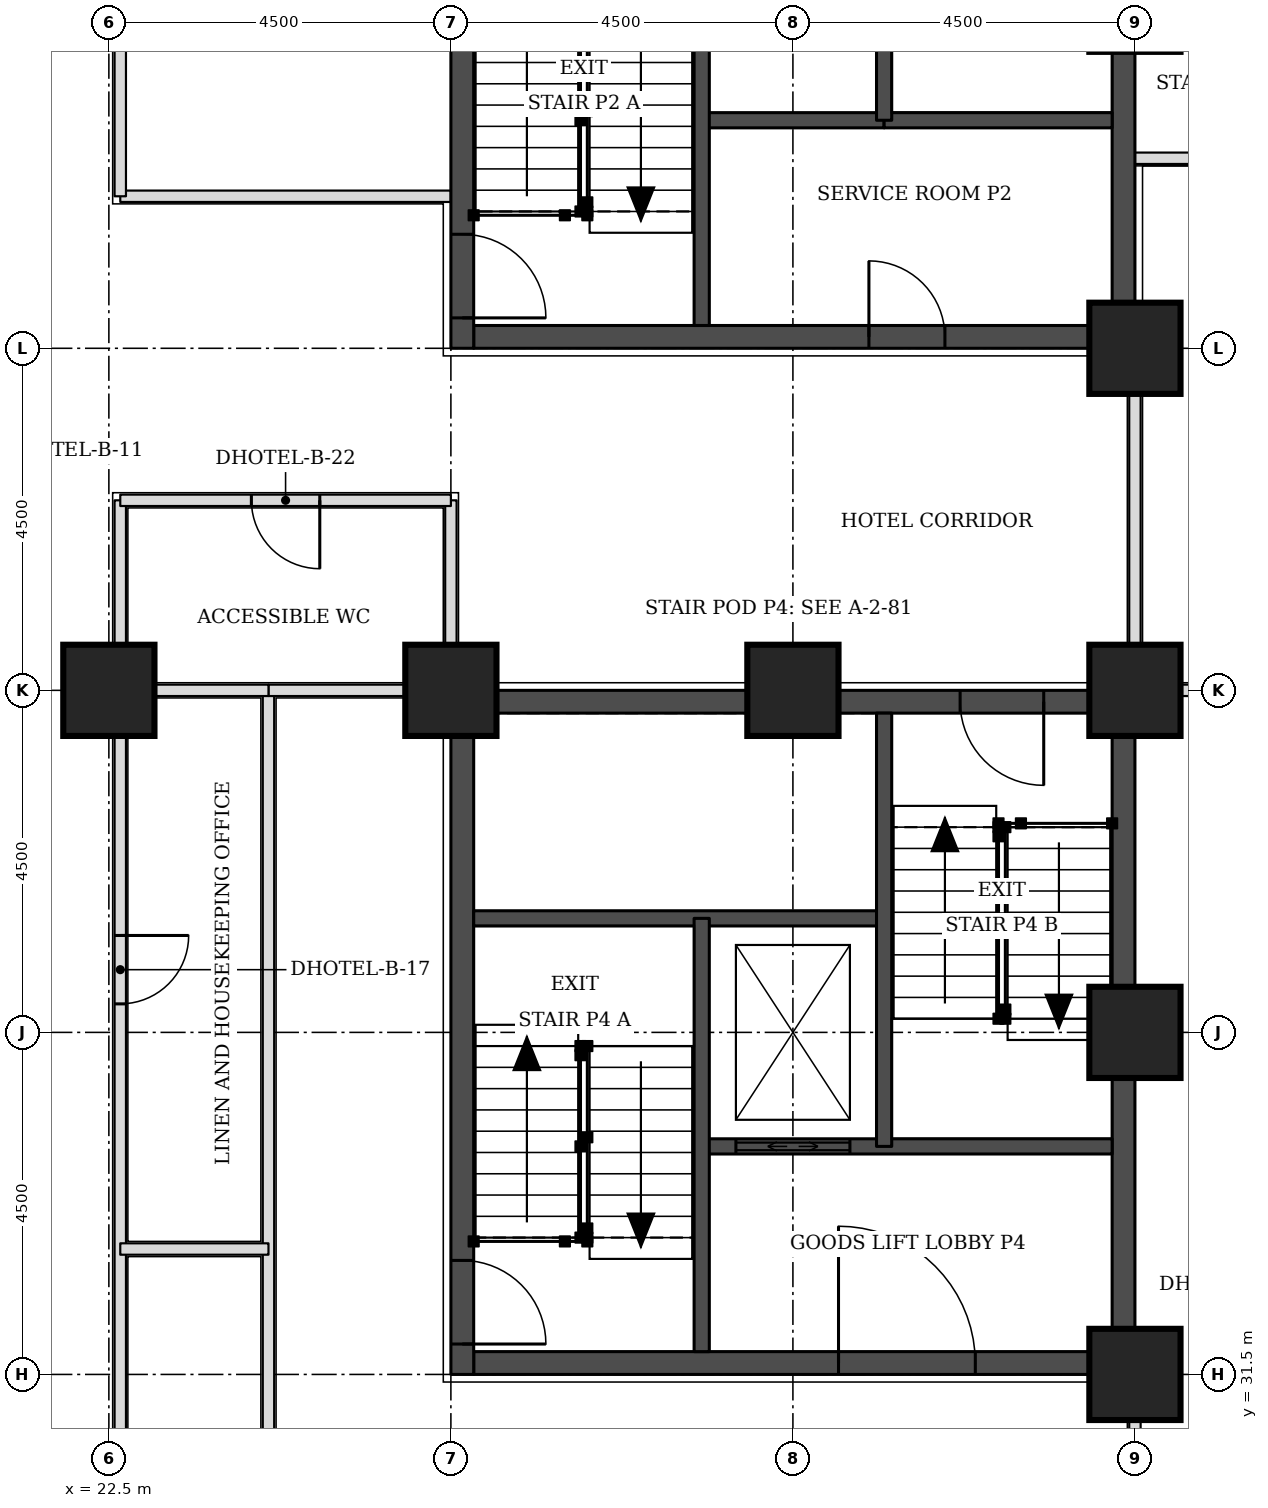
"""IFC4 building model, lengths in metres.
Left out: names, types, materials, properties, quantities, classifications, styles, units other than length and angle.
Written with IfcOpenShell. Run it as: python <this file> out.ifc"""

import sys

from ifc_helpers import new_model, si_unit, direction, frame, frame_2d, origin, origin_2d, place, context, subcontext, project, spatial, rectangle, extrude, element, fill, save


model = new_model("IFC4")
c1 = context("Model", 3, precision=1e-05, world=origin(), true_north=direction((0.0, 1.0)))
c2 = subcontext(c1, "Body", "Model", "MODEL_VIEW")
j1 = project(units=[si_unit("LENGTHUNIT", "METRE"), si_unit("PLANEANGLEUNIT", "RADIAN")], contexts=[c1])
p1 = place(None, origin())
s1 = spatial("IfcSite", under=j1, at=p1, CompositionType="ELEMENT")
p2 = place(p1, origin())
s2 = spatial("IfcBuilding", under=s1, at=p2, CompositionType="ELEMENT")
p3 = place(p2, frame((0.0, 0.0, 52.8)))
s3 = spatial("IfcBuildingStorey", under=s2, at=p3, CompositionType="ELEMENT", Elevation=52.8)
for number, where, z_axis, x_axis in (
    (1, (36.0, 31.5, 0.0), (0.0, 0.0, 1.0), (1.0, 0.0, 0.0)),
    (2, (36.0, 36.0, 0.0), (0.0, 0.0, 1.0), (1.0, 0.0, 0.0)),
    (3, (22.5, 40.5, 0.0), (0.0, 0.0, 1.0), (1.0, 0.0, 0.0)),
    (4, (27.0, 40.5, 0.0), (0.0, 0.0, 1.0), (1.0, 0.0, 0.0)),
    (5, (31.5, 40.5, 0.0), (0.0, 0.0, 1.0), (1.0, 0.0, 0.0)),
    (6, (36.0, 40.5, 0.0), (0.0, 0.0, 1.0), (1.0, 0.0, 0.0)),
    (7, (36.0, 45.0, 0.0), (0.0, 0.0, 1.0), (1.0, 0.0, 0.0)),
):
    element("IfcColumn", number, at=place(p3, frame(where, z_axis=z_axis, x_axis=x_axis)), inside=s3, PredefinedType="COLUMN", context=c2, shape_type="SweptSolid", body=[
        extrude(rectangle(XDim=1.2, YDim=1.2, at=origin_2d()), origin(), (0.0, 0.0, 1.0), 3.3),
    ])
p4 = place(p3, frame((27.3, 45.15, 0.0), z_axis=(0.0, 0.0, 1.0), x_axis=(1.0, 0.0, 0.0)))
e8 = element("IfcWall", 8, at=p4, inside=s3, PredefinedType="SHEAR", context=c2, shape_type="SweptSolid", body=[
    extrude(rectangle(XDim=8.4, YDim=0.3, at=frame_2d((4.2, 0.0))), origin(), (0.0, 0.0, 1.0), 3.3),
])
p5 = place(p4, frame((5.2, 0.0, 0.0)))
e9 = element("IfcOpeningElement", 9, at=p5, cuts=e8, PredefinedType="OPENING", context=c2, shape_type="SweptSolid", body=[
    extrude(rectangle(XDim=1.0, YDim=2.1, at=frame_2d((0.5, 1.05))), frame((0.0, 0.16, 0.0), z_axis=(0.0, -1.0, 0.0), x_axis=(1.0, 0.0, 0.0)), (0.0, 0.0, 1.0), 0.32),
])
p6 = place(p3, frame((27.15, 45.0, 0.0), z_axis=(0.0, 0.0, 1.0), x_axis=(0.0, 1.0, 0.0)))
e10 = element("IfcWall", 10, at=p6, inside=s3, PredefinedType="SHEAR", context=c2, shape_type="SweptSolid", body=[
    extrude(rectangle(XDim=9.0, YDim=0.3, at=frame_2d((4.5, 0.0))), origin(), (0.0, 0.0, 1.0), 3.3),
])
p7 = place(p6, frame((0.4, 0.0, 0.0)))
e11 = element("IfcOpeningElement", 11, at=p7, cuts=e10, PredefinedType="OPENING", context=c2, shape_type="SweptSolid", body=[
    extrude(rectangle(XDim=1.1, YDim=2.1, at=frame_2d((0.55, 1.05))), frame((0.0, 0.16, 0.0), z_axis=(0.0, -1.0, 0.0), x_axis=(1.0, 0.0, 0.0)), (0.0, 0.0, 1.0), 0.32),
])
p8 = place(p3, frame((35.85, 45.0, 0.0), z_axis=(0.0, 0.0, 1.0), x_axis=(0.0, 1.0, 0.0)))
e12 = element("IfcWall", 12, at=p8, inside=s3, PredefinedType="SHEAR", context=c2, shape_type="SweptSolid", body=[
    extrude(rectangle(XDim=9.0, YDim=0.3, at=frame_2d((4.5, 0.0))), origin(), (0.0, 0.0, 1.0), 3.3),
])
p9 = place(p3, frame((27.3, 31.65, 0.0), z_axis=(0.0, 0.0, 1.0), x_axis=(1.0, 0.0, 0.0)))
e13 = element("IfcWall", 13, at=p9, inside=s3, PredefinedType="SHEAR", context=c2, shape_type="SweptSolid", body=[
    extrude(rectangle(XDim=8.4, YDim=0.3, at=frame_2d((4.2, 0.0))), origin(), (0.0, 0.0, 1.0), 3.3),
])
p10 = place(p9, frame((4.8, 0.0, 0.0)))
e14 = element("IfcOpeningElement", 14, at=p10, cuts=e13, PredefinedType="OPENING", context=c2, shape_type="SweptSolid", body=[
    extrude(rectangle(XDim=1.8, YDim=2.1, at=frame_2d((0.9, 1.05))), frame((0.0, 0.16, 0.0), z_axis=(0.0, -1.0, 0.0), x_axis=(1.0, 0.0, 0.0)), (0.0, 0.0, 1.0), 0.32),
])
p11 = place(p3, frame((27.3, 40.35, 0.0), z_axis=(0.0, 0.0, 1.0), x_axis=(1.0, 0.0, 0.0)))
e15 = element("IfcWall", 15, at=p11, inside=s3, PredefinedType="SHEAR", context=c2, shape_type="SweptSolid", body=[
    extrude(rectangle(XDim=8.4, YDim=0.3, at=frame_2d((4.2, 0.0))), origin(), (0.0, 0.0, 1.0), 3.3),
])
p12 = place(p11, frame((6.4, 0.0, 0.0)))
e16 = element("IfcOpeningElement", 16, at=p12, cuts=e15, PredefinedType="OPENING", context=c2, shape_type="SweptSolid", body=[
    extrude(rectangle(XDim=1.1, YDim=2.1, at=frame_2d((0.55, 1.05))), frame((0.0, 0.16, 0.0), z_axis=(0.0, -1.0, 0.0), x_axis=(1.0, 0.0, 0.0)), (0.0, 0.0, 1.0), 0.32),
])
p13 = place(p3, frame((27.15, 31.5, 0.0), z_axis=(0.0, 0.0, 1.0), x_axis=(0.0, 1.0, 0.0)))
e17 = element("IfcWall", 17, at=p13, inside=s3, PredefinedType="SHEAR", context=c2, shape_type="SweptSolid", body=[
    extrude(rectangle(XDim=9.0, YDim=0.3, at=frame_2d((4.5, 0.0))), origin(), (0.0, 0.0, 1.0), 3.3),
])
p14 = place(p13, frame((0.4, 0.0, 0.0)))
e18 = element("IfcOpeningElement", 18, at=p14, cuts=e17, PredefinedType="OPENING", context=c2, shape_type="SweptSolid", body=[
    extrude(rectangle(XDim=1.1, YDim=2.1, at=frame_2d((0.55, 1.05))), frame((0.0, 0.16, 0.0), z_axis=(0.0, -1.0, 0.0), x_axis=(1.0, 0.0, 0.0)), (0.0, 0.0, 1.0), 0.32),
])
p15 = place(p3, frame((35.85, 31.5, 0.0), z_axis=(0.0, 0.0, 1.0), x_axis=(0.0, 1.0, 0.0)))
e19 = element("IfcWall", 19, at=p15, inside=s3, PredefinedType="SHEAR", context=c2, shape_type="SweptSolid", body=[
    extrude(rectangle(XDim=9.0, YDim=0.3, at=frame_2d((4.5, 0.0))), origin(), (0.0, 0.0, 1.0), 3.3),
])
p16 = place(p3, frame((22.65, 25.65, 0.0), z_axis=(0.0, 0.0, 1.0), x_axis=(0.0, 1.0, 0.0)))
e20 = element("IfcWall", 20, at=p16, inside=s3, PredefinedType="PARTITIONING", context=c2, shape_type="SweptSolid", body=[
    extrude(rectangle(XDim=17.35, YDim=0.15, at=frame_2d((8.675, 0.0))), origin(), (0.0, 0.0, 1.0), 3.08),
])
p17 = place(p16, frame((3.3, 0.0, 0.0)))
e21 = element("IfcOpeningElement", 21, at=p17, cuts=e20, PredefinedType="OPENING", context=c2, shape_type="SweptSolid", body=[
    extrude(rectangle(XDim=0.9, YDim=2.1, at=frame_2d((0.45, 1.05))), frame((0.0, 0.085, 0.0), z_axis=(0.0, -1.0, 0.0), x_axis=(1.0, 0.0, 0.0)), (0.0, 0.0, 1.0), 0.17),
])
p18 = place(p16, frame((10.725, 0.0, 0.0)))
e22 = element("IfcOpeningElement", 22, at=p18, cuts=e20, PredefinedType="OPENING", context=c2, shape_type="SweptSolid", body=[
    extrude(rectangle(XDim=0.9, YDim=2.1, at=frame_2d((0.45, 1.05))), frame((0.0, 0.085, 0.0), z_axis=(0.0, -1.0, 0.0), x_axis=(1.0, 0.0, 0.0)), (0.0, 0.0, 1.0), 0.17),
])
p19 = place(p3, frame((24.6, 25.65, 0.0), z_axis=(0.0, 0.0, 1.0), x_axis=(0.0, 1.0, 0.0)))
e23 = element("IfcWall", 23, at=p19, inside=s3, PredefinedType="PARTITIONING", context=c2, shape_type="SweptSolid", body=[
    extrude(rectangle(XDim=14.85, YDim=0.15, at=frame_2d((7.425, 0.0))), origin(), (0.0, 0.0, 1.0), 3.08),
])
p20 = place(p3, frame((36.0, 29.5, 0.0), z_axis=(0.0, 0.0, 1.0), x_axis=(0.0, 1.0, 0.0)))
e24 = element("IfcWall", 24, at=p20, inside=s3, PredefinedType="PARTITIONING", context=c2, shape_type="SweptSolid", body=[
    extrude(rectangle(XDim=1.95, YDim=0.15, at=frame_2d((0.975, 0.0))), origin(), (0.0, 0.0, 1.0), 2.33),
])
p21 = place(p3, frame((24.6, 40.5, 0.0), z_axis=(0.0, 0.0, 1.0), x_axis=(1.0, 0.0, 0.0)))
e25 = element("IfcWall", 25, at=p21, inside=s3, PredefinedType="PARTITIONING", context=c2, shape_type="SweptSolid", body=[
    extrude(rectangle(XDim=2.35, YDim=0.15, at=frame_2d((1.175, 0.0))), origin(), (0.0, 0.0, 1.0), 2.33),
])
p22 = place(p3, frame((27.0, 40.55, 0.0), z_axis=(0.0, 0.0, 1.0), x_axis=(0.0, 1.0, 0.0)))
e26 = element("IfcWall", 26, at=p22, inside=s3, PredefinedType="PARTITIONING", context=c2, shape_type="SweptSolid", body=[
    extrude(rectangle(XDim=2.45, YDim=0.15, at=frame_2d((1.225, 0.0))), origin(), (0.0, 0.0, 1.0), 3.08),
])
p23 = place(p3, frame((36.0, 40.55, 0.0), z_axis=(0.0, 0.0, 1.0), x_axis=(0.0, 1.0, 0.0)))
e27 = element("IfcWall", 27, at=p23, inside=s3, PredefinedType="PARTITIONING", context=c2, shape_type="SweptSolid", body=[
    extrude(rectangle(XDim=4.4, YDim=0.15, at=frame_2d((2.2, 0.0))), origin(), (0.0, 0.0, 1.0), 2.33),
])
p24 = place(p3, frame((22.65, 43.0, 0.0), z_axis=(0.0, 0.0, 1.0), x_axis=(1.0, 0.0, 0.0)))
e28 = element("IfcWall", 28, at=p24, inside=s3, PredefinedType="PARTITIONING", context=c2, shape_type="SweptSolid", body=[
    extrude(rectangle(XDim=4.35, YDim=0.15, at=frame_2d((2.175, 0.0))), origin(), (0.0, 0.0, 1.0), 3.08),
])
p25 = place(p24, frame((1.725, 0.0, 0.0)))
e29 = element("IfcOpeningElement", 29, at=p25, cuts=e28, PredefinedType="OPENING", context=c2, shape_type="SweptSolid", body=[
    extrude(rectangle(XDim=0.9, YDim=2.1, at=frame_2d((0.45, 1.05))), frame((0.0, 0.085, 0.0), z_axis=(0.0, -1.0, 0.0), x_axis=(1.0, 0.0, 0.0)), (0.0, 0.0, 1.0), 0.17),
])
p26 = place(p3, frame((22.65, 47.0, 0.0), z_axis=(0.0, 0.0, 1.0), x_axis=(1.0, 0.0, 0.0)))
e30 = element("IfcWall", 30, at=p26, inside=s3, PredefinedType="PARTITIONING", context=c2, shape_type="SweptSolid", body=[
    extrude(rectangle(XDim=4.35, YDim=0.15, at=frame_2d((2.175, 0.0))), origin(), (0.0, 0.0, 1.0), 3.08),
])
p27 = place(p3, frame((22.65, 47.0, 0.0), z_axis=(0.0, 0.0, 1.0), x_axis=(0.0, 1.0, 0.0)))
e31 = element("IfcWall", 31, at=p27, inside=s3, PredefinedType="PARTITIONING", context=c2, shape_type="SweptSolid", body=[
    extrude(rectangle(XDim=2.5, YDim=0.15, at=frame_2d((1.25, 0.0))), origin(), (0.0, 0.0, 1.0), 3.08),
])
p28 = place(p3, frame((22.65, 33.15, 0.0), z_axis=(0.0, 0.0, 1.0), x_axis=(1.0, 0.0, 0.0)))
e32 = element("IfcWall", 32, at=p28, inside=s3, PredefinedType="PARTITIONING", context=c2, shape_type="SweptSolid", body=[
    extrude(rectangle(XDim=1.95, YDim=0.15, at=frame_2d((0.975, 0.0))), origin(), (0.0, 0.0, 1.0), 3.08),
])
p29 = place(p3, frame((22.65, 40.5, 0.0), z_axis=(0.0, 0.0, 1.0), x_axis=(1.0, 0.0, 0.0)))
e33 = element("IfcWall", 33, at=p29, inside=s3, PredefinedType="PARTITIONING", context=c2, shape_type="SweptSolid", body=[
    extrude(rectangle(XDim=1.95, YDim=0.15, at=frame_2d((0.975, 0.0))), origin(), (0.0, 0.0, 1.0), 2.33),
])
p30 = place(p3, frame((36.05, 40.5, 0.0), z_axis=(0.0, 0.0, 1.0), x_axis=(1.0, 0.0, 0.0)))
e34 = element("IfcWall", 34, at=p30, inside=s3, PredefinedType="PARTITIONING", context=c2, shape_type="SweptSolid", body=[
    extrude(rectangle(XDim=2.45, YDim=0.15, at=frame_2d((1.225, 0.0))), origin(), (0.0, 0.0, 1.0), 2.33),
])
p31 = place(p3, frame((36.0, 47.5, 0.0), z_axis=(0.0, 0.0, 1.0), x_axis=(1.0, 0.0, 0.0)))
e35 = element("IfcWall", 35, at=p31, inside=s3, PredefinedType="PARTITIONING", context=c2, shape_type="SweptSolid", body=[
    extrude(rectangle(XDim=7.0, YDim=0.15, at=frame_2d((3.5, 0.0))), origin(), (0.0, 0.0, 1.0), 3.08),
])
p32 = place(p3, frame((30.3, 48.0, 0.0), z_axis=(0.0, 0.0, 1.0), x_axis=(1.0, 0.0, 0.0)))
e36 = element("IfcWall", 36, at=p32, inside=s3, PredefinedType="SOLIDWALL", context=c2, shape_type="SweptSolid", body=[
    extrude(rectangle(XDim=2.4, YDim=0.2, at=frame_2d((1.2, 0.0))), origin(), (0.0, 0.0, 1.0), 3.08),
])
p33 = place(p3, frame((32.7, 48.0, 0.0), z_axis=(0.0, 0.0, 1.0), x_axis=(1.0, 0.0, 0.0)))
e37 = element("IfcWall", 37, at=p33, inside=s3, PredefinedType="SOLIDWALL", context=c2, shape_type="SweptSolid", body=[
    extrude(rectangle(XDim=3.0, YDim=0.2, at=frame_2d((1.5, 0.0))), origin(), (0.0, 0.0, 1.0), 3.08),
])
for number, where, z_axis, x_axis in (
    (38, (30.3, 45.3, 0.0), (0.0, 0.0, 1.0), (0.0, 1.0, 0.0)),
    (39, (32.7, 48.0, 0.0), (0.0, 0.0, 1.0), (0.0, 1.0, 0.0)),
):
    element("IfcWall", number, at=place(p3, frame(where, z_axis=z_axis, x_axis=x_axis)), inside=s3, PredefinedType="SOLIDWALL", context=c2, shape_type="SweptSolid", body=[
        extrude(rectangle(XDim=5.7, YDim=0.2, at=frame_2d((2.85, 0.0))), origin(), (0.0, 0.0, 1.0), 3.08),
    ])
p34 = place(p3, frame((30.3, 34.5, 0.0), z_axis=(0.0, 0.0, 1.0), x_axis=(1.0, 0.0, 0.0)))
e40 = element("IfcWall", 40, at=p34, inside=s3, PredefinedType="SOLIDWALL", context=c2, shape_type="SweptSolid", body=[
    extrude(rectangle(XDim=5.4, YDim=0.2, at=frame_2d((2.7, 0.0))), origin(), (0.0, 0.0, 1.0), 3.08),
])
p35 = place(p34, frame((0.45, 0.0, 0.0)))
e41 = element("IfcOpeningElement", 41, at=p35, cuts=e40, PredefinedType="OPENING", context=c2, shape_type="SweptSolid", body=[
    extrude(rectangle(XDim=1.5, YDim=2.1, at=frame_2d((0.75, 1.05))), frame((0.0, 0.11, 0.0), z_axis=(0.0, -1.0, 0.0), x_axis=(1.0, 0.0, 0.0)), (0.0, 0.0, 1.0), 0.22),
])
p36 = place(p3, frame((27.3, 37.5, 0.0), z_axis=(0.0, 0.0, 1.0), x_axis=(1.0, 0.0, 0.0)))
e42 = element("IfcWall", 42, at=p36, inside=s3, PredefinedType="SOLIDWALL", context=c2, shape_type="SweptSolid", body=[
    extrude(rectangle(XDim=5.4, YDim=0.2, at=frame_2d((2.7, 0.0))), origin(), (0.0, 0.0, 1.0), 3.08),
])
for number, where, z_axis, x_axis in (
    (43, (30.3, 31.8, 0.0), (0.0, 0.0, 1.0), (0.0, 1.0, 0.0)),
    (44, (32.7, 34.5, 0.0), (0.0, 0.0, 1.0), (0.0, 1.0, 0.0)),
):
    element("IfcWall", number, at=place(p3, frame(where, z_axis=z_axis, x_axis=x_axis)), inside=s3, PredefinedType="SOLIDWALL", context=c2, shape_type="SweptSolid", body=[
        extrude(rectangle(XDim=5.7, YDim=0.2, at=frame_2d((2.85, 0.0))), origin(), (0.0, 0.0, 1.0), 3.08),
    ])
p37 = place(p18, frame((0.9, 0.0, 0.0), z_axis=(0.0, 0.0, 1.0), x_axis=(-1.0, 0.0, 0.0)))
e45 = element("IfcDoor", 45, at=p37, inside=s3, OperationType="SINGLE_SWING_LEFT", PredefinedType="DOOR", context=c2, shape_type="SweptSolid", body=[
    extrude(rectangle(XDim=0.9, YDim=2.1, at=frame_2d((0.45, 1.05))), frame((0.0, 0.025, 0.0), z_axis=(0.0, -1.0, 0.0), x_axis=(1.0, 0.0, 0.0)), (0.0, 0.0, 1.0), 0.05),
])
fill(e22, e45)
p38 = place(p25, frame((0.9, 0.0, 0.0), z_axis=(0.0, 0.0, 1.0), x_axis=(-1.0, 0.0, 0.0)))
e46 = element("IfcDoor", 46, at=p38, inside=s3, OperationType="SINGLE_SWING_LEFT", PredefinedType="DOOR", context=c2, shape_type="SweptSolid", body=[
    extrude(rectangle(XDim=0.9, YDim=2.1, at=frame_2d((0.45, 1.05))), frame((0.0, 0.025, 0.0), z_axis=(0.0, -1.0, 0.0), x_axis=(1.0, 0.0, 0.0)), (0.0, 0.0, 1.0), 0.05),
])
fill(e29, e46)
p39 = place(p7, frame((1.1, 0.0, 0.0), z_axis=(0.0, 0.0, 1.0), x_axis=(-1.0, 0.0, 0.0)))
e47 = element("IfcDoor", 47, at=p39, inside=s3, OperationType="SINGLE_SWING_RIGHT", PredefinedType="DOOR", context=c2, shape_type="SweptSolid", body=[
    extrude(rectangle(XDim=1.1, YDim=2.1, at=frame_2d((0.55, 1.05))), frame((0.0, 0.025, 0.0), z_axis=(0.0, -1.0, 0.0), x_axis=(1.0, 0.0, 0.0)), (0.0, 0.0, 1.0), 0.05),
])
fill(e11, e47)
p40 = place(p5, origin())
e48 = element("IfcDoor", 48, at=p40, inside=s3, OperationType="SINGLE_SWING_LEFT", PredefinedType="DOOR", context=c2, shape_type="SweptSolid", body=[
    extrude(rectangle(XDim=1.0, YDim=2.1, at=frame_2d((0.5, 1.05))), frame((0.0, 0.025, 0.0), z_axis=(0.0, -1.0, 0.0), x_axis=(1.0, 0.0, 0.0)), (0.0, 0.0, 1.0), 0.05),
])
fill(e9, e48)
p41 = place(p14, frame((1.1, 0.0, 0.0), z_axis=(0.0, 0.0, 1.0), x_axis=(-1.0, 0.0, 0.0)))
e49 = element("IfcDoor", 49, at=p41, inside=s3, OperationType="SINGLE_SWING_RIGHT", PredefinedType="DOOR", context=c2, shape_type="SweptSolid", body=[
    extrude(rectangle(XDim=1.1, YDim=2.1, at=frame_2d((0.55, 1.05))), frame((0.0, 0.025, 0.0), z_axis=(0.0, -1.0, 0.0), x_axis=(1.0, 0.0, 0.0)), (0.0, 0.0, 1.0), 0.05),
])
fill(e18, e49)
p42 = place(p12, frame((1.1, 0.0, 0.0), z_axis=(0.0, 0.0, 1.0), x_axis=(-1.0, 0.0, 0.0)))
e50 = element("IfcDoor", 50, at=p42, inside=s3, OperationType="SINGLE_SWING_LEFT", PredefinedType="DOOR", context=c2, shape_type="SweptSolid", body=[
    extrude(rectangle(XDim=1.1, YDim=2.1, at=frame_2d((0.55, 1.05))), frame((0.0, 0.025, 0.0), z_axis=(0.0, -1.0, 0.0), x_axis=(1.0, 0.0, 0.0)), (0.0, 0.0, 1.0), 0.05),
])
fill(e16, e50)
p43 = place(p35, origin())
e51 = element("IfcDoor", 51, at=p43, inside=s3, OperationType="DOUBLE_DOOR_SLIDING", PredefinedType="DOOR", context=c2, shape_type="SweptSolid", body=[
    extrude(rectangle(XDim=1.5, YDim=2.1, at=frame_2d((0.75, 1.05))), frame((0.0, 0.025, 0.0), z_axis=(0.0, -1.0, 0.0), x_axis=(1.0, 0.0, 0.0)), (0.0, 0.0, 1.0), 0.05),
])
fill(e41, e51)
p44 = place(p10, origin())
e52 = element("IfcDoor", 52, at=p44, inside=s3, OperationType="SINGLE_SWING_LEFT", PredefinedType="DOOR", context=c2, shape_type="SweptSolid", body=[
    extrude(rectangle(XDim=1.8, YDim=2.1, at=frame_2d((0.9, 1.05))), frame((0.0, 0.025, 0.0), z_axis=(0.0, -1.0, 0.0), x_axis=(1.0, 0.0, 0.0)), (0.0, 0.0, 1.0), 0.05),
])
fill(e14, e52)
save(model, sys.argv[1])
